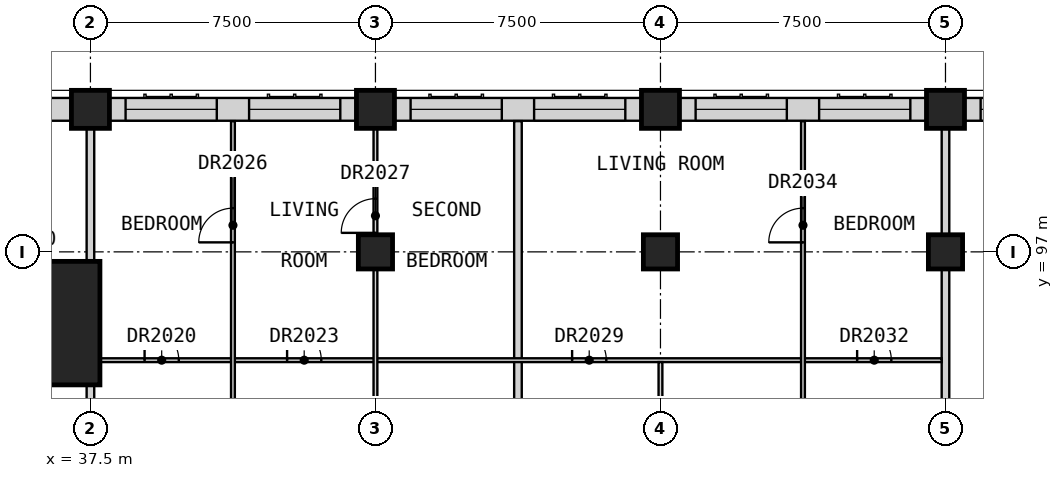
"""IFC4 building model, lengths in metres.
Left out: names, types, materials, properties, quantities, classifications, styles, units other than length and angle.
Written with IfcOpenShell. Run it as: python <this file> out.ifc"""

import sys

from ifc_helpers import new_model, si_unit, direction, frame, frame_2d, origin, origin_2d, place, context, subcontext, project, spatial, rectangle, extrude, element, fill, save


model = new_model("IFC4")
c1 = context("Model", 3, precision=1e-05, world=origin(), true_north=direction((0.0, 1.0)))
c2 = subcontext(c1, "Body", "Model", "MODEL_VIEW")
j1 = project(units=[si_unit("LENGTHUNIT", "METRE"), si_unit("PLANEANGLEUNIT", "RADIAN")], contexts=[c1])
p1 = place(None, origin())
s1 = spatial("IfcSite", under=j1, at=p1, CompositionType="ELEMENT")
p2 = place(p1, origin())
s2 = spatial("IfcBuilding", under=s1, at=p2, CompositionType="ELEMENT")
p3 = place(p2, frame((0.0, 0.0, 182.7)))
s3 = spatial("IfcBuildingStorey", under=s2, at=p3, CompositionType="ELEMENT", Elevation=182.7)
for number, where, z_axis, x_axis in (
    (1, (37.5, 100.75, 0.0), (0.0, 0.0, 1.0), (1.0, 0.0, 0.0)),
    (2, (45.0, 100.75, 0.0), (0.0, 0.0, 1.0), (1.0, 0.0, 0.0)),
    (3, (52.5, 100.75, 0.0), (0.0, 0.0, 1.0), (1.0, 0.0, 0.0)),
    (4, (60.0, 100.75, 0.0), (0.0, 0.0, 1.0), (1.0, 0.0, 0.0)),
):
    element("IfcColumn", number, at=place(p3, frame(where, z_axis=z_axis, x_axis=x_axis)), inside=s3, PredefinedType="COLUMN", context=c2, shape_type="SweptSolid", body=[
        extrude(rectangle(XDim=1.0, YDim=1.0, at=origin_2d()), origin(), (0.0, 0.0, 1.0), 3.5),
    ])
for number, where, z_axis, x_axis in (
    (5, (45.0, 97.0, 0.0), (0.0, 0.0, 1.0), (1.0, 0.0, 0.0)),
    (6, (52.5, 97.0, 0.0), (0.0, 0.0, 1.0), (1.0, 0.0, 0.0)),
    (7, (60.0, 97.0, 0.0), (0.0, 0.0, 1.0), (1.0, 0.0, 0.0)),
):
    element("IfcColumn", number, at=place(p3, frame(where, z_axis=z_axis, x_axis=x_axis)), inside=s3, PredefinedType="COLUMN", context=c2, shape_type="SweptSolid", body=[
        extrude(rectangle(XDim=0.9, YDim=0.9, at=origin_2d()), origin(), (0.0, 0.0, 1.0), 3.5),
    ])
p4 = place(p3, frame((36.125, 95.125, 0.0), z_axis=(0.0, 0.0, 1.0), x_axis=(1.0, 0.0, 0.0)))
e8 = element("IfcColumn", 8, at=p4, inside=s3, PredefinedType="COLUMN", context=c2, shape_type="SweptSolid", body=[
    extrude(rectangle(XDim=3.25, YDim=3.25, at=origin_2d()), origin(), (0.0, 0.0, 1.0), 3.5),
])
p5 = place(p3, frame((67.0, 100.75, 0.0), z_axis=(0.0, 0.0, 1.0), x_axis=(-1.0, 0.0, 0.0)))
e9 = element("IfcWall", 9, at=p5, inside=s3, PredefinedType="SOLIDWALL", context=c2, shape_type="SweptSolid", body=[
    extrude(rectangle(XDim=6.5, YDim=0.6, at=frame_2d((3.25, 0.0))), origin(), (0.0, 0.0, 1.0), 2.75),
])
p6 = place(p5, frame((3.675, 0.0, 0.8)))
e10 = element("IfcOpeningElement", 10, at=p6, cuts=e9, PredefinedType="OPENING", context=c2, shape_type="SweptSolid", body=[
    extrude(rectangle(XDim=2.4, YDim=1.8, at=frame_2d((1.2, 0.9))), frame((0.0, 0.31, 0.0), z_axis=(0.0, -1.0, 0.0), x_axis=(1.0, 0.0, 0.0)), (0.0, 0.0, 1.0), 0.62),
])
p7 = place(p5, frame((0.425, 0.0, 0.8)))
e11 = element("IfcOpeningElement", 11, at=p7, cuts=e9, PredefinedType="OPENING", context=c2, shape_type="SweptSolid", body=[
    extrude(rectangle(XDim=2.4, YDim=1.8, at=frame_2d((1.2, 0.9))), frame((0.0, 0.31, 0.0), z_axis=(0.0, -1.0, 0.0), x_axis=(1.0, 0.0, 0.0)), (0.0, 0.0, 1.0), 0.62),
])
p8 = place(p3, frame((59.5, 100.75, 0.0), z_axis=(0.0, 0.0, 1.0), x_axis=(-1.0, 0.0, 0.0)))
e12 = element("IfcWall", 12, at=p8, inside=s3, PredefinedType="SOLIDWALL", context=c2, shape_type="SweptSolid", body=[
    extrude(rectangle(XDim=6.5, YDim=0.6, at=frame_2d((3.25, 0.0))), origin(), (0.0, 0.0, 1.0), 2.75),
])
p9 = place(p8, frame((3.675, 0.0, 0.8)))
e13 = element("IfcOpeningElement", 13, at=p9, cuts=e12, PredefinedType="OPENING", context=c2, shape_type="SweptSolid", body=[
    extrude(rectangle(XDim=2.4, YDim=1.8, at=frame_2d((1.2, 0.9))), frame((0.0, 0.31, 0.0), z_axis=(0.0, -1.0, 0.0), x_axis=(1.0, 0.0, 0.0)), (0.0, 0.0, 1.0), 0.62),
])
p10 = place(p8, frame((0.425, 0.0, 0.8)))
e14 = element("IfcOpeningElement", 14, at=p10, cuts=e12, PredefinedType="OPENING", context=c2, shape_type="SweptSolid", body=[
    extrude(rectangle(XDim=2.4, YDim=1.8, at=frame_2d((1.2, 0.9))), frame((0.0, 0.31, 0.0), z_axis=(0.0, -1.0, 0.0), x_axis=(1.0, 0.0, 0.0)), (0.0, 0.0, 1.0), 0.62),
])
p11 = place(p3, frame((52.0, 100.75, 0.0), z_axis=(0.0, 0.0, 1.0), x_axis=(-1.0, 0.0, 0.0)))
e15 = element("IfcWall", 15, at=p11, inside=s3, PredefinedType="SOLIDWALL", context=c2, shape_type="SweptSolid", body=[
    extrude(rectangle(XDim=6.5, YDim=0.6, at=frame_2d((3.25, 0.0))), origin(), (0.0, 0.0, 1.0), 2.75),
])
p12 = place(p11, frame((3.675, 0.0, 0.8)))
e16 = element("IfcOpeningElement", 16, at=p12, cuts=e15, PredefinedType="OPENING", context=c2, shape_type="SweptSolid", body=[
    extrude(rectangle(XDim=2.4, YDim=1.8, at=frame_2d((1.2, 0.9))), frame((0.0, 0.31, 0.0), z_axis=(0.0, -1.0, 0.0), x_axis=(1.0, 0.0, 0.0)), (0.0, 0.0, 1.0), 0.62),
])
p13 = place(p11, frame((0.425, 0.0, 0.8)))
e17 = element("IfcOpeningElement", 17, at=p13, cuts=e15, PredefinedType="OPENING", context=c2, shape_type="SweptSolid", body=[
    extrude(rectangle(XDim=2.4, YDim=1.8, at=frame_2d((1.2, 0.9))), frame((0.0, 0.31, 0.0), z_axis=(0.0, -1.0, 0.0), x_axis=(1.0, 0.0, 0.0)), (0.0, 0.0, 1.0), 0.62),
])
p14 = place(p3, frame((44.5, 100.75, 0.0), z_axis=(0.0, 0.0, 1.0), x_axis=(-1.0, 0.0, 0.0)))
e18 = element("IfcWall", 18, at=p14, inside=s3, PredefinedType="SOLIDWALL", context=c2, shape_type="SweptSolid", body=[
    extrude(rectangle(XDim=6.5, YDim=0.6, at=frame_2d((3.25, 0.0))), origin(), (0.0, 0.0, 1.0), 2.75),
])
p15 = place(p14, frame((3.675, 0.0, 0.8)))
e19 = element("IfcOpeningElement", 19, at=p15, cuts=e18, PredefinedType="OPENING", context=c2, shape_type="SweptSolid", body=[
    extrude(rectangle(XDim=2.4, YDim=1.8, at=frame_2d((1.2, 0.9))), frame((0.0, 0.31, 0.0), z_axis=(0.0, -1.0, 0.0), x_axis=(1.0, 0.0, 0.0)), (0.0, 0.0, 1.0), 0.62),
])
p16 = place(p14, frame((0.425, 0.0, 0.8)))
e20 = element("IfcOpeningElement", 20, at=p16, cuts=e18, PredefinedType="OPENING", context=c2, shape_type="SweptSolid", body=[
    extrude(rectangle(XDim=2.4, YDim=1.8, at=frame_2d((1.2, 0.9))), frame((0.0, 0.31, 0.0), z_axis=(0.0, -1.0, 0.0), x_axis=(1.0, 0.0, 0.0)), (0.0, 0.0, 1.0), 0.62),
])
p17 = place(p3, frame((37.0, 100.75, 0.0), z_axis=(0.0, 0.0, 1.0), x_axis=(-1.0, 0.0, 0.0)))
e21 = element("IfcWall", 21, at=p17, inside=s3, PredefinedType="SOLIDWALL", context=c2, shape_type="SweptSolid", body=[
    extrude(rectangle(XDim=2.5, YDim=0.6, at=frame_2d((1.25, 0.0))), origin(), (0.0, 0.0, 1.0), 3.25),
])
p18 = place(p3, frame((37.5, 84.675, 0.0), z_axis=(0.0, 0.0, 1.0), x_axis=(0.0, 1.0, 0.0)))
e22 = element("IfcWall", 22, at=p18, inside=s3, PredefinedType="PARTITIONING", context=c2, shape_type="SweptSolid", body=[
    extrude(rectangle(XDim=16.575, YDim=0.2, at=frame_2d((8.288, 0.0))), origin(), (0.0, 0.0, 1.0), 2.75),
])
p19 = place(p3, frame((48.75, 84.675, 0.0), z_axis=(0.0, 0.0, 1.0), x_axis=(0.0, 1.0, 0.0)))
e23 = element("IfcWall", 23, at=p19, inside=s3, PredefinedType="PARTITIONING", context=c2, shape_type="SweptSolid", body=[
    extrude(rectangle(XDim=15.765, YDim=0.2, at=frame_2d((7.882, 0.0))), origin(), (0.0, 0.0, 1.0), 3.25),
])
p20 = place(p3, frame((60.0, 84.675, 0.0), z_axis=(0.0, 0.0, 1.0), x_axis=(0.0, 1.0, 0.0)))
e24 = element("IfcWall", 24, at=p20, inside=s3, PredefinedType="PARTITIONING", context=c2, shape_type="SweptSolid", body=[
    extrude(rectangle(XDim=16.575, YDim=0.2, at=frame_2d((8.288, 0.0))), origin(), (0.0, 0.0, 1.0), 3.25),
])
p21 = place(p3, frame((37.6, 94.15, 0.0), z_axis=(0.0, 0.0, 1.0), x_axis=(1.0, 0.0, 0.0)))
e25 = element("IfcWall", 25, at=p21, inside=s3, PredefinedType="PARTITIONING", context=c2, shape_type="SweptSolid", body=[
    extrude(rectangle(XDim=22.3, YDim=0.1, at=frame_2d((11.15, 0.0))), origin(), (0.0, 0.0, 1.0), 3.25),
])
p22 = place(p21, frame((1.325, 0.0, 0.0)))
e26 = element("IfcOpeningElement", 26, at=p22, cuts=e25, PredefinedType="OPENING", context=c2, shape_type="SweptSolid", body=[
    extrude(rectangle(XDim=0.9, YDim=2.1, at=frame_2d((0.45, 1.05))), frame((0.0, 0.06, 0.0), z_axis=(0.0, -1.0, 0.0), x_axis=(1.0, 0.0, 0.0)), (0.0, 0.0, 1.0), 0.12),
])
p23 = place(p21, frame((5.075, 0.0, 0.0)))
e27 = element("IfcOpeningElement", 27, at=p23, cuts=e25, PredefinedType="OPENING", context=c2, shape_type="SweptSolid", body=[
    extrude(rectangle(XDim=0.9, YDim=2.1, at=frame_2d((0.45, 1.05))), frame((0.0, 0.06, 0.0), z_axis=(0.0, -1.0, 0.0), x_axis=(1.0, 0.0, 0.0)), (0.0, 0.0, 1.0), 0.12),
])
p24 = place(p21, frame((12.575, 0.0, 0.0)))
e28 = element("IfcOpeningElement", 28, at=p24, cuts=e25, PredefinedType="OPENING", context=c2, shape_type="SweptSolid", body=[
    extrude(rectangle(XDim=0.9, YDim=2.1, at=frame_2d((0.45, 1.05))), frame((0.0, 0.06, 0.0), z_axis=(0.0, -1.0, 0.0), x_axis=(1.0, 0.0, 0.0)), (0.0, 0.0, 1.0), 0.12),
])
p25 = place(p21, frame((20.075, 0.0, 0.0)))
e29 = element("IfcOpeningElement", 29, at=p25, cuts=e25, PredefinedType="OPENING", context=c2, shape_type="SweptSolid", body=[
    extrude(rectangle(XDim=0.9, YDim=2.1, at=frame_2d((0.45, 1.05))), frame((0.0, 0.06, 0.0), z_axis=(0.0, -1.0, 0.0), x_axis=(1.0, 0.0, 0.0)), (0.0, 0.0, 1.0), 0.12),
])
p26 = place(p3, frame((41.25, 89.438, 0.0), z_axis=(0.0, 0.0, 1.0), x_axis=(0.0, 1.0, 0.0)))
e30 = element("IfcWall", 30, at=p26, inside=s3, PredefinedType="PARTITIONING", context=c2, shape_type="SweptSolid", body=[
    extrude(rectangle(XDim=11.002, YDim=0.1, at=frame_2d((5.501, 0.0))), origin(), (0.0, 0.0, 1.0), 3.25),
])
p27 = place(p26, frame((7.812, 0.0, 0.0)))
e31 = element("IfcOpeningElement", 31, at=p27, cuts=e30, PredefinedType="OPENING", context=c2, shape_type="SweptSolid", body=[
    extrude(rectangle(XDim=0.9, YDim=2.1, at=frame_2d((0.45, 1.05))), frame((0.0, 0.06, 0.0), z_axis=(0.0, -1.0, 0.0), x_axis=(1.0, 0.0, 0.0)), (0.0, 0.0, 1.0), 0.12),
])
p28 = place(p3, frame((45.0, 89.438, 0.0), z_axis=(0.0, 0.0, 1.0), x_axis=(0.0, 1.0, 0.0)))
e32 = element("IfcWall", 32, at=p28, inside=s3, PredefinedType="PARTITIONING", context=c2, shape_type="SweptSolid", body=[
    extrude(rectangle(XDim=11.812, YDim=0.1, at=frame_2d((5.906, 0.0))), origin(), (0.0, 0.0, 1.0), 3.25),
])
p29 = place(p28, frame((1.875, 0.0, 0.0)))
e33 = element("IfcOpeningElement", 33, at=p29, cuts=e32, PredefinedType="OPENING", context=c2, shape_type="SweptSolid", body=[
    extrude(rectangle(XDim=0.9, YDim=2.1, at=frame_2d((0.45, 1.05))), frame((0.0, 0.06, 0.0), z_axis=(0.0, -1.0, 0.0), x_axis=(1.0, 0.0, 0.0)), (0.0, 0.0, 1.0), 0.12),
])
p30 = place(p28, frame((8.062, 0.0, 0.0)))
e34 = element("IfcOpeningElement", 34, at=p30, cuts=e32, PredefinedType="OPENING", context=c2, shape_type="SweptSolid", body=[
    extrude(rectangle(XDim=0.9, YDim=2.1, at=frame_2d((0.45, 1.05))), frame((0.0, 0.06, 0.0), z_axis=(0.0, -1.0, 0.0), x_axis=(1.0, 0.0, 0.0)), (0.0, 0.0, 1.0), 0.12),
])
p31 = place(p3, frame((52.5, 89.438, 0.0), z_axis=(0.0, 0.0, 1.0), x_axis=(0.0, 1.0, 0.0)))
e35 = element("IfcWall", 35, at=p31, inside=s3, PredefinedType="PARTITIONING", context=c2, shape_type="SweptSolid", body=[
    extrude(rectangle(XDim=4.663, YDim=0.1, at=frame_2d((2.331, 0.0))), origin(), (0.0, 0.0, 1.0), 3.25),
])
p32 = place(p31, frame((1.875, 0.0, 0.0)))
e36 = element("IfcOpeningElement", 36, at=p32, cuts=e35, PredefinedType="OPENING", context=c2, shape_type="SweptSolid", body=[
    extrude(rectangle(XDim=0.9, YDim=2.1, at=frame_2d((0.45, 1.05))), frame((0.0, 0.06, 0.0), z_axis=(0.0, -1.0, 0.0), x_axis=(1.0, 0.0, 0.0)), (0.0, 0.0, 1.0), 0.12),
])
p33 = place(p3, frame((56.25, 89.438, 0.0), z_axis=(0.0, 0.0, 1.0), x_axis=(0.0, 1.0, 0.0)))
e37 = element("IfcWall", 37, at=p33, inside=s3, PredefinedType="PARTITIONING", context=c2, shape_type="SweptSolid", body=[
    extrude(rectangle(XDim=11.002, YDim=0.1, at=frame_2d((5.501, 0.0))), origin(), (0.0, 0.0, 1.0), 3.25),
])
p34 = place(p33, frame((7.812, 0.0, 0.0)))
e38 = element("IfcOpeningElement", 38, at=p34, cuts=e37, PredefinedType="OPENING", context=c2, shape_type="SweptSolid", body=[
    extrude(rectangle(XDim=0.9, YDim=2.1, at=frame_2d((0.45, 1.05))), frame((0.0, 0.06, 0.0), z_axis=(0.0, -1.0, 0.0), x_axis=(1.0, 0.0, 0.0)), (0.0, 0.0, 1.0), 0.12),
])
p35 = place(p6, origin())
e39 = element("IfcWindow", 39, at=p35, inside=s3, PartitioningType="SINGLE_PANEL", PredefinedType="WINDOW", context=c2, shape_type="SweptSolid", body=[
    extrude(rectangle(XDim=2.4, YDim=1.8, at=frame_2d((1.2, 0.9))), frame((0.0, -0.07, 0.0), z_axis=(0.0, -1.0, 0.0), x_axis=(1.0, 0.0, 0.0)), (0.0, 0.0, 1.0), 0.06),
])
fill(e10, e39)
p36 = place(p9, origin())
e40 = element("IfcWindow", 40, at=p36, inside=s3, PartitioningType="SINGLE_PANEL", PredefinedType="WINDOW", context=c2, shape_type="SweptSolid", body=[
    extrude(rectangle(XDim=2.4, YDim=1.8, at=frame_2d((1.2, 0.9))), frame((0.0, -0.07, 0.0), z_axis=(0.0, -1.0, 0.0), x_axis=(1.0, 0.0, 0.0)), (0.0, 0.0, 1.0), 0.06),
])
fill(e13, e40)
p37 = place(p10, origin())
e41 = element("IfcWindow", 41, at=p37, inside=s3, PartitioningType="SINGLE_PANEL", PredefinedType="WINDOW", context=c2, shape_type="SweptSolid", body=[
    extrude(rectangle(XDim=2.4, YDim=1.8, at=frame_2d((1.2, 0.9))), frame((0.0, -0.07, 0.0), z_axis=(0.0, -1.0, 0.0), x_axis=(1.0, 0.0, 0.0)), (0.0, 0.0, 1.0), 0.06),
])
fill(e14, e41)
p38 = place(p12, origin())
e42 = element("IfcWindow", 42, at=p38, inside=s3, PartitioningType="SINGLE_PANEL", PredefinedType="WINDOW", context=c2, shape_type="SweptSolid", body=[
    extrude(rectangle(XDim=2.4, YDim=1.8, at=frame_2d((1.2, 0.9))), frame((0.0, -0.07, 0.0), z_axis=(0.0, -1.0, 0.0), x_axis=(1.0, 0.0, 0.0)), (0.0, 0.0, 1.0), 0.06),
])
fill(e16, e42)
p39 = place(p13, origin())
e43 = element("IfcWindow", 43, at=p39, inside=s3, PartitioningType="SINGLE_PANEL", PredefinedType="WINDOW", context=c2, shape_type="SweptSolid", body=[
    extrude(rectangle(XDim=2.4, YDim=1.8, at=frame_2d((1.2, 0.9))), frame((0.0, -0.07, 0.0), z_axis=(0.0, -1.0, 0.0), x_axis=(1.0, 0.0, 0.0)), (0.0, 0.0, 1.0), 0.06),
])
fill(e17, e43)
p40 = place(p15, origin())
e44 = element("IfcWindow", 44, at=p40, inside=s3, PartitioningType="SINGLE_PANEL", PredefinedType="WINDOW", context=c2, shape_type="SweptSolid", body=[
    extrude(rectangle(XDim=2.4, YDim=1.8, at=frame_2d((1.2, 0.9))), frame((0.0, -0.07, 0.0), z_axis=(0.0, -1.0, 0.0), x_axis=(1.0, 0.0, 0.0)), (0.0, 0.0, 1.0), 0.06),
])
fill(e19, e44)
p41 = place(p16, origin())
e45 = element("IfcWindow", 45, at=p41, inside=s3, PartitioningType="SINGLE_PANEL", PredefinedType="WINDOW", context=c2, shape_type="SweptSolid", body=[
    extrude(rectangle(XDim=2.4, YDim=1.8, at=frame_2d((1.2, 0.9))), frame((0.0, -0.07, 0.0), z_axis=(0.0, -1.0, 0.0), x_axis=(1.0, 0.0, 0.0)), (0.0, 0.0, 1.0), 0.06),
])
fill(e20, e45)
p42 = place(p22, origin())
e46 = element("IfcDoor", 46, at=p42, inside=s3, OperationType="SINGLE_SWING_RIGHT", PredefinedType="DOOR", context=c2, shape_type="SweptSolid", body=[
    extrude(rectangle(XDim=0.9, YDim=2.1, at=frame_2d((0.45, 1.05))), frame((0.0, 0.025, 0.0), z_axis=(0.0, -1.0, 0.0), x_axis=(1.0, 0.0, 0.0)), (0.0, 0.0, 1.0), 0.05),
])
fill(e26, e46)
p43 = place(p23, origin())
e47 = element("IfcDoor", 47, at=p43, inside=s3, OperationType="SINGLE_SWING_RIGHT", PredefinedType="DOOR", context=c2, shape_type="SweptSolid", body=[
    extrude(rectangle(XDim=0.9, YDim=2.1, at=frame_2d((0.45, 1.05))), frame((0.0, 0.025, 0.0), z_axis=(0.0, -1.0, 0.0), x_axis=(1.0, 0.0, 0.0)), (0.0, 0.0, 1.0), 0.05),
])
fill(e27, e47)
p44 = place(p27, origin())
e48 = element("IfcDoor", 48, at=p44, inside=s3, OperationType="SINGLE_SWING_RIGHT", PredefinedType="DOOR", context=c2, shape_type="SweptSolid", body=[
    extrude(rectangle(XDim=0.9, YDim=2.1, at=frame_2d((0.45, 1.05))), frame((0.0, 0.025, 0.0), z_axis=(0.0, -1.0, 0.0), x_axis=(1.0, 0.0, 0.0)), (0.0, 0.0, 1.0), 0.05),
])
fill(e31, e48)
p45 = place(p30, origin())
e49 = element("IfcDoor", 49, at=p45, inside=s3, OperationType="SINGLE_SWING_RIGHT", PredefinedType="DOOR", context=c2, shape_type="SweptSolid", body=[
    extrude(rectangle(XDim=0.9, YDim=2.1, at=frame_2d((0.45, 1.05))), frame((0.0, 0.025, 0.0), z_axis=(0.0, -1.0, 0.0), x_axis=(1.0, 0.0, 0.0)), (0.0, 0.0, 1.0), 0.05),
])
fill(e34, e49)
p46 = place(p24, origin())
e50 = element("IfcDoor", 50, at=p46, inside=s3, OperationType="SINGLE_SWING_RIGHT", PredefinedType="DOOR", context=c2, shape_type="SweptSolid", body=[
    extrude(rectangle(XDim=0.9, YDim=2.1, at=frame_2d((0.45, 1.05))), frame((0.0, 0.025, 0.0), z_axis=(0.0, -1.0, 0.0), x_axis=(1.0, 0.0, 0.0)), (0.0, 0.0, 1.0), 0.05),
])
fill(e28, e50)
p47 = place(p25, origin())
e51 = element("IfcDoor", 51, at=p47, inside=s3, OperationType="SINGLE_SWING_RIGHT", PredefinedType="DOOR", context=c2, shape_type="SweptSolid", body=[
    extrude(rectangle(XDim=0.9, YDim=2.1, at=frame_2d((0.45, 1.05))), frame((0.0, 0.025, 0.0), z_axis=(0.0, -1.0, 0.0), x_axis=(1.0, 0.0, 0.0)), (0.0, 0.0, 1.0), 0.05),
])
fill(e29, e51)
p48 = place(p34, origin())
e52 = element("IfcDoor", 52, at=p48, inside=s3, OperationType="SINGLE_SWING_RIGHT", PredefinedType="DOOR", context=c2, shape_type="SweptSolid", body=[
    extrude(rectangle(XDim=0.9, YDim=2.1, at=frame_2d((0.45, 1.05))), frame((0.0, 0.025, 0.0), z_axis=(0.0, -1.0, 0.0), x_axis=(1.0, 0.0, 0.0)), (0.0, 0.0, 1.0), 0.05),
])
fill(e38, e52)
save(model, sys.argv[1])
